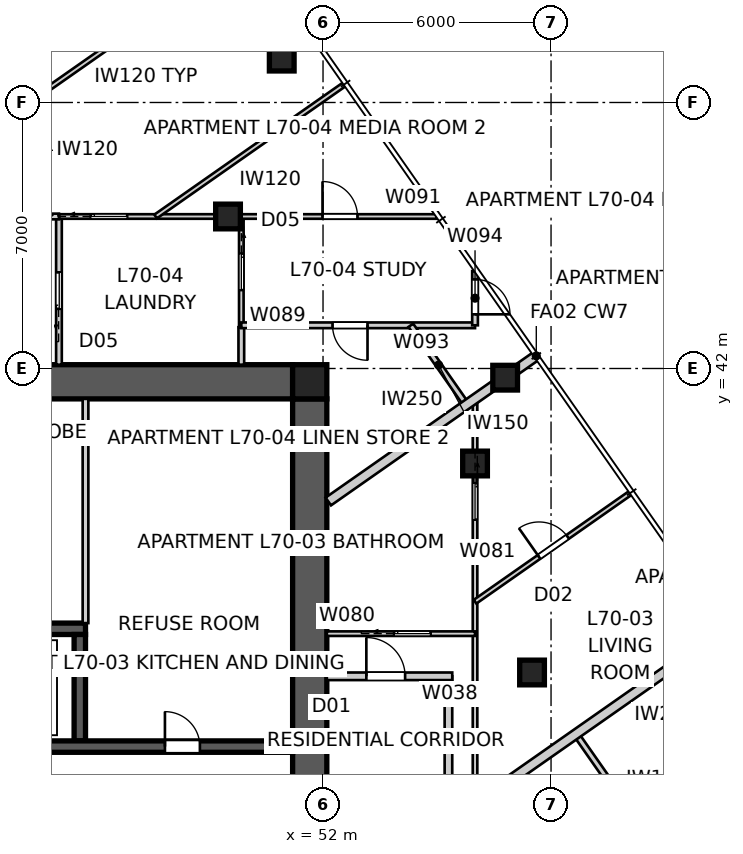
"""IFC4 building model, lengths in metres.
Left out: names, types, materials, properties, quantities, classifications, styles, units other than length and angle.
Written with IfcOpenShell. Run it as: python <this file> out.ifc"""

import sys

from ifc_helpers import new_model, si_unit, direction, frame, frame_2d, origin, origin_2d, place, context, subcontext, project, spatial, polyline, rectangle, outline, extrude, element, fill, save


model = new_model("IFC4")
c1 = context("Model", 3, precision=1e-05, world=origin(), true_north=direction((0.0, 1.0)))
c2 = subcontext(c1, "Body", "Model", "MODEL_VIEW")
j1 = project(units=[si_unit("LENGTHUNIT", "METRE"), si_unit("PLANEANGLEUNIT", "RADIAN")], contexts=[c1])
p1 = place(None, origin())
s1 = spatial("IfcSite", under=j1, at=p1, CompositionType="ELEMENT")
p2 = place(p1, origin())
s2 = spatial("IfcBuilding", under=s1, at=p2, CompositionType="ELEMENT")
p3 = place(p2, frame((0.0, 0.0, 254.0)))
s3 = spatial("IfcBuildingStorey", under=s2, at=p3, CompositionType="ELEMENT", Elevation=254.0)
p4 = place(p3, frame((28.8, 41.65, 0.0), z_axis=(0.0, 0.0, 1.0), x_axis=(1.0, 0.0, 0.0)))
e1 = element("IfcWall", 1, at=p4, inside=s3, PredefinedType="SHEAR", context=c2, shape_type="SweptSolid", body=[
    extrude(outline(polyline([(0.0, -0.45), (22.4, -0.45), (22.4, -0.025), (22.85, -0.025), (22.85, 0.025), (22.4, 0.025), (22.4, 0.45), (0.0, 0.45), (0.0, 0.025), (-0.45, 0.025), (-0.45, -0.025), (0.0, -0.025), (0.0, -0.45)])), origin(), (0.0, 0.0, 1.0), 3.4),
])
p5 = place(p3, frame((51.65, 18.8, 0.0), z_axis=(0.0, 0.0, 1.0), x_axis=(0.0, 1.0, 0.0)))
e2 = element("IfcWall", 2, at=p5, inside=s3, PredefinedType="SHEAR", context=c2, shape_type="SweptSolid", body=[
    extrude(outline(polyline([(0.0, -0.45), (22.4, -0.45), (22.4, -0.025), (22.85, -0.025), (22.85, 0.025), (22.4, 0.025), (22.4, 0.45), (0.0, 0.45), (0.0, 0.025), (-0.45, 0.025), (-0.45, -0.025), (0.0, -0.025), (0.0, -0.45)])), origin(), (0.0, 0.0, 1.0), 3.4),
])
p6 = place(p5, frame((11.14, 0.0, 0.0)))
e3 = element("IfcOpeningElement", 3, at=p6, cuts=e2, PredefinedType="OPENING", context=c2, shape_type="SweptSolid", body=[
    extrude(rectangle(XDim=1.02, YDim=2.4, at=frame_2d((0.51, 1.2))), frame((0.0, 0.46, 0.0), z_axis=(0.0, -1.0, 0.0), x_axis=(1.0, 0.0, 0.0)), (0.0, 0.0, 1.0), 0.92),
])
p7 = place(p3, frame((28.8, 32.05, 0.0), z_axis=(0.0, 0.0, 1.0), x_axis=(1.0, 0.0, 0.0)))
e4 = element("IfcWall", 4, at=p7, inside=s3, PredefinedType="SHEAR", context=c2, shape_type="SweptSolid", body=[
    extrude(rectangle(XDim=22.4, YDim=0.3, at=frame_2d((11.2, 0.0))), origin(), (0.0, 0.0, 1.0), 3.4),
])
p8 = place(p7, frame((19.04, 0.0, 0.0)))
e5 = element("IfcOpeningElement", 5, at=p8, cuts=e4, PredefinedType="OPENING", context=c2, shape_type="SweptSolid", body=[
    extrude(rectangle(XDim=0.92, YDim=2.1, at=frame_2d((0.46, 1.05))), frame((0.0, 0.16, 0.0), z_axis=(0.0, -1.0, 0.0), x_axis=(1.0, 0.0, 0.0)), (0.0, 0.0, 1.0), 0.32),
])
p9 = place(p7, frame((1.265, 0.0, 0.0)))
e6 = element("IfcOpeningElement", 6, at=p9, cuts=e4, PredefinedType="OPENING", context=c2, shape_type="SweptSolid", body=[
    extrude(rectangle(XDim=1.02, YDim=2.1, at=frame_2d((0.51, 1.05))), frame((0.0, 0.16, 0.0), z_axis=(0.0, -1.0, 0.0), x_axis=(1.0, 0.0, 0.0)), (0.0, 0.0, 1.0), 0.32),
])
p10 = place(p7, frame((4.015, 0.0, 0.0)))
e7 = element("IfcOpeningElement", 7, at=p10, cuts=e4, PredefinedType="OPENING", context=c2, shape_type="SweptSolid", body=[
    extrude(rectangle(XDim=0.92, YDim=2.1, at=frame_2d((0.46, 1.05))), frame((0.0, 0.16, 0.0), z_axis=(0.0, -1.0, 0.0), x_axis=(1.0, 0.0, 0.0)), (0.0, 0.0, 1.0), 0.32),
])
p11 = place(p7, frame((6.115, 0.0, 0.0)))
e8 = element("IfcOpeningElement", 8, at=p11, cuts=e4, PredefinedType="OPENING", context=c2, shape_type="SweptSolid", body=[
    extrude(rectangle(XDim=0.92, YDim=2.1, at=frame_2d((0.46, 1.05))), frame((0.0, 0.16, 0.0), z_axis=(0.0, -1.0, 0.0), x_axis=(1.0, 0.0, 0.0)), (0.0, 0.0, 1.0), 0.32),
])
p12 = place(p7, frame((9.79, 0.0, 0.0)))
e9 = element("IfcOpeningElement", 9, at=p12, cuts=e4, PredefinedType="OPENING", context=c2, shape_type="SweptSolid", body=[
    extrude(rectangle(XDim=0.92, YDim=2.1, at=frame_2d((0.46, 1.05))), frame((0.0, 0.16, 0.0), z_axis=(0.0, -1.0, 0.0), x_axis=(1.0, 0.0, 0.0)), (0.0, 0.0, 1.0), 0.32),
])
p13 = place(p7, frame((12.05, 0.0, 0.0)))
e10 = element("IfcOpeningElement", 10, at=p13, cuts=e4, PredefinedType="OPENING", context=c2, shape_type="SweptSolid", body=[
    extrude(rectangle(XDim=1.1, YDim=2.1, at=frame_2d((0.55, 1.05))), frame((0.0, 0.16, 0.0), z_axis=(0.0, -1.0, 0.0), x_axis=(1.0, 0.0, 0.0)), (0.0, 0.0, 1.0), 0.32),
])
p14 = place(p7, frame((14.85, 0.0, 0.0)))
e11 = element("IfcOpeningElement", 11, at=p14, cuts=e4, PredefinedType="OPENING", context=c2, shape_type="SweptSolid", body=[
    extrude(rectangle(XDim=1.1, YDim=2.1, at=frame_2d((0.55, 1.05))), frame((0.0, 0.16, 0.0), z_axis=(0.0, -1.0, 0.0), x_axis=(1.0, 0.0, 0.0)), (0.0, 0.0, 1.0), 0.32),
])
p15 = place(p3, frame((34.25, 35.15, 0.0), z_axis=(0.0, 0.0, 1.0), x_axis=(1.0, 0.0, 0.0)))
e12 = element("IfcWall", 12, at=p15, inside=s3, PredefinedType="SHEAR", context=c2, shape_type="SweptSolid", body=[
    extrude(rectangle(XDim=11.5, YDim=0.3, at=frame_2d((5.75, 0.0))), origin(), (0.0, 0.0, 1.0), 3.4),
])
p16 = place(p3, frame((45.6, 32.2, 0.0), z_axis=(0.0, 0.0, 1.0), x_axis=(0.0, 1.0, 0.0)))
e13 = element("IfcWall", 13, at=p16, inside=s3, PredefinedType="SHEAR", context=c2, shape_type="SweptSolid", body=[
    extrude(rectangle(XDim=2.8, YDim=0.3, at=frame_2d((1.4, 0.0))), origin(), (0.0, 0.0, 1.0), 3.4),
])
p17 = place(p3, frame((51.65, 41.65, 0.0), z_axis=(0.0, 0.0, 1.0), x_axis=(1.0, 0.0, 0.0)))
e14 = element("IfcColumn", 14, at=p17, inside=s3, PredefinedType="COLUMN", context=c2, shape_type="SweptSolid", body=[
    extrude(rectangle(XDim=0.9, YDim=0.9, at=origin_2d()), origin(), (0.0, 0.0, 1.0), 3.4),
])
for number, where, z_axis, x_axis in (
    (15, (56.793, 41.758, 0.0), (0.0, 0.0, 1.0), (1.0, 0.0, 0.0)),
    (16, (50.914, 50.155, 0.0), (0.0, 0.0, 1.0), (1.0, 0.0, 0.0)),
    (17, (57.5, 34.0, 0.0), (0.0, 0.0, 1.0), (1.0, 0.0, 0.0)),
    (18, (56.0, 39.5, 0.0), (0.0, 0.0, 1.0), (1.0, 0.0, 0.0)),
    (19, (49.5, 46.0, 0.0), (0.0, 0.0, 1.0), (1.0, 0.0, 0.0)),
):
    element("IfcColumn", number, at=place(p3, frame(where, z_axis=z_axis, x_axis=x_axis)), inside=s3, PredefinedType="COLUMN", context=c2, shape_type="SweptSolid", body=[
        extrude(rectangle(XDim=0.65, YDim=0.65, at=origin_2d()), origin(), (0.0, 0.0, 1.0), 3.4),
    ])
p18 = place(p3, frame((55.3, 26.1, 0.0), z_axis=(0.0, 0.0, 1.0), x_axis=(0.0, 1.0, 0.0)))
e20 = element("IfcWall", 20, at=p18, inside=s3, PredefinedType="PARTITIONING", context=c2, shape_type="SweptSolid", body=[
    extrude(rectangle(XDim=7.8, YDim=0.2, at=frame_2d((3.9, 0.0))), origin(), (0.0, 0.0, 1.0), 3.25),
])
p19 = place(p3, frame((52.1, 33.9, 0.0), z_axis=(0.0, 0.0, 1.0), x_axis=(1.0, 0.0, 0.0)))
e21 = element("IfcWall", 21, at=p19, inside=s3, PredefinedType="PARTITIONING", context=c2, shape_type="SweptSolid", body=[
    extrude(rectangle(XDim=3.3, YDim=0.2, at=frame_2d((1.65, 0.0))), origin(), (0.0, 0.0, 1.0), 3.25),
])
p20 = place(p19, frame((1.04, 0.0, 0.0)))
e22 = element("IfcOpeningElement", 22, at=p20, cuts=e21, PredefinedType="OPENING", context=c2, shape_type="SweptSolid", body=[
    extrude(rectangle(XDim=1.02, YDim=2.34, at=frame_2d((0.51, 1.17))), frame((0.0, 0.11, 0.0), z_axis=(0.0, -1.0, 0.0), x_axis=(1.0, 0.0, 0.0)), (0.0, 0.0, 1.0), 0.22),
])
p21 = place(p3, frame((57.612, 42.332, 0.0), z_axis=(0.0, 0.0, 1.0), x_axis=(-0.819161528122, -0.573562891796, 0.0)))
e23 = element("IfcWall", 23, at=p21, inside=s3, PredefinedType="PARTITIONING", context=c2, shape_type="SweptSolid", body=[
    extrude(rectangle(XDim=6.681, YDim=0.25, at=frame_2d((3.341, 0.0))), origin(), (0.0, 0.0, 1.0), 3.25),
])
p22 = place(p3, frame((62.631, 35.164, 0.0), z_axis=(0.0, 0.0, 1.0), x_axis=(-0.819152220062, -0.573576185321, 0.0)))
e24 = element("IfcWall", 24, at=p22, inside=s3, PredefinedType="PARTITIONING", context=c2, shape_type="SweptSolid", body=[
    extrude(rectangle(XDim=8.779, YDim=0.25, at=frame_2d((4.39, 0.0))), origin(), (0.0, 0.0, 1.0), 3.25),
])
p23 = place(p3, frame((45.75, 41.2, 0.0), z_axis=(0.0, 0.0, 1.0), x_axis=(0.0, -1.0, 0.0)))
e25 = element("IfcWall", 25, at=p23, inside=s3, PredefinedType="SOLIDWALL", context=c2, shape_type="SweptSolid", body=[
    extrude(rectangle(XDim=5.9, YDim=0.15, at=frame_2d((2.95, 0.0))), origin(), (0.0, 0.0, 1.0), 3.25),
])
p24 = place(p3, frame((56.0, 41.203, 0.0), z_axis=(0.0, 0.0, 1.0), x_axis=(0.0, -1.0, 0.0)))
e26 = element("IfcWall", 26, at=p24, inside=s3, PredefinedType="PARTITIONING", context=c2, shape_type="SweptSolid", body=[
    extrude(rectangle(XDim=26.198, YDim=0.12, at=frame_2d((13.099, 0.0))), origin(), (0.0, 0.0, 1.0), 2.549),
])
p25 = place(p24, frame((21.188, 0.0, 0.0)))
e27 = element("IfcOpeningElement", 27, at=p25, cuts=e26, PredefinedType="OPENING", context=c2, shape_type="SweptSolid", body=[
    extrude(rectangle(XDim=0.92, YDim=2.34, at=frame_2d((0.46, 1.17))), frame((0.0, 0.07, 0.0), z_axis=(0.0, -1.0, 0.0), x_axis=(1.0, 0.0, 0.0)), (0.0, 0.0, 1.0), 0.14),
])
p26 = place(p24, frame((17.537, 0.0, 0.0)))
e28 = element("IfcOpeningElement", 28, at=p26, cuts=e26, PredefinedType="OPENING", context=c2, shape_type="SweptSolid", body=[
    extrude(rectangle(XDim=0.92, YDim=2.34, at=frame_2d((0.46, 1.17))), frame((0.0, 0.07, 0.0), z_axis=(0.0, -1.0, 0.0), x_axis=(1.0, 0.0, 0.0)), (0.0, 0.0, 1.0), 0.14),
])
p27 = place(p24, frame((2.221, 0.0, 0.0)))
e29 = element("IfcOpeningElement", 29, at=p27, cuts=e26, PredefinedType="OPENING", context=c2, shape_type="SweptSolid", body=[
    extrude(rectangle(XDim=0.96, YDim=2.1, at=frame_2d((0.48, 1.05))), frame((0.0, 0.07, 0.0), z_axis=(0.0, -1.0, 0.0), x_axis=(1.0, 0.0, 0.0)), (0.0, 0.0, 1.0), 0.14),
])
p28 = place(p3, frame((61.164, 28.797, 0.0), z_axis=(0.0, 0.0, 1.0), x_axis=(-0.573563463091, 0.81916112811, 0.0)))
e30 = element("IfcWall", 30, at=p28, inside=s3, PredefinedType="SOLIDWALL", context=c2, shape_type="SweptSolid", body=[
    extrude(rectangle(XDim=4.375, YDim=0.15, at=frame_2d((2.188, 0.0))), origin(), (0.0, 0.0, 1.0), 3.25),
])
p29 = place(p3, frame((52.1, 35.022, 0.0), z_axis=(0.0, 0.0, 1.0), x_axis=(1.0, 0.0, 0.0)))
e31 = element("IfcWall", 31, at=p29, inside=s3, PredefinedType="PARTITIONING", context=c2, shape_type="SweptSolid", body=[
    extrude(rectangle(XDim=3.9, YDim=0.12, at=frame_2d((1.95, 0.0))), origin(), (0.0, 0.0, 1.0), 3.25),
])
p30 = place(p29, frame((1.77, 0.0, 0.0)))
e32 = element("IfcOpeningElement", 32, at=p30, cuts=e31, PredefinedType="OPENING", context=c2, shape_type="SweptSolid", body=[
    extrude(rectangle(XDim=0.96, YDim=2.1, at=frame_2d((0.48, 1.05))), frame((0.0, 0.07, 0.0), z_axis=(0.0, -1.0, 0.0), x_axis=(1.0, 0.0, 0.0)), (0.0, 0.0, 1.0), 0.14),
])
p31 = place(p3, frame((56.0, 35.862, 0.0), z_axis=(0.0, 0.0, 1.0), x_axis=(0.819144584763, 0.57358708951, 0.0)))
e33 = element("IfcWall", 33, at=p31, inside=s3, PredefinedType="PARTITIONING", context=c2, shape_type="SweptSolid", body=[
    extrude(rectangle(XDim=4.991, YDim=0.12, at=frame_2d((2.496, 0.0))), origin(), (0.0, 0.0, 1.0), 3.25),
])
p32 = place(p31, frame((2.055, 0.0, 0.0)))
e34 = element("IfcOpeningElement", 34, at=p32, cuts=e33, PredefinedType="OPENING", context=c2, shape_type="SweptSolid", body=[
    extrude(rectangle(XDim=0.92, YDim=2.34, at=frame_2d((0.46, 1.17))), frame((0.0, 0.07, 0.0), z_axis=(0.0, -1.0, 0.0), x_axis=(1.0, 0.0, 0.0)), (0.0, 0.0, 1.0), 0.14),
])
p33 = place(p3, frame((45.051, 42.1, 0.0), z_axis=(0.0, 0.0, 1.0), x_axis=(0.0, 1.0, 0.0)))
e35 = element("IfcWall", 35, at=p33, inside=s3, PredefinedType="SOLIDWALL", context=c2, shape_type="SweptSolid", body=[
    extrude(rectangle(XDim=3.9, YDim=0.15, at=frame_2d((1.95, 0.0))), origin(), (0.0, 0.0, 1.0), 3.25),
])
p34 = place(p33, frame((1.47, 0.0, 0.0)))
e36 = element("IfcOpeningElement", 36, at=p34, cuts=e35, PredefinedType="OPENING", context=c2, shape_type="SweptSolid", body=[
    extrude(rectangle(XDim=0.96, YDim=2.1, at=frame_2d((0.48, 1.05))), frame((0.0, 0.085, 0.0), z_axis=(0.0, -1.0, 0.0), x_axis=(1.0, 0.0, 0.0)), (0.0, 0.0, 1.0), 0.17),
])
p35 = place(p3, frame((49.85, 46.0, 0.0), z_axis=(0.0, 0.0, 1.0), x_axis=(0.0, -1.0, 0.0)))
e37 = element("IfcWall", 37, at=p35, inside=s3, PredefinedType="PARTITIONING", context=c2, shape_type="SweptSolid", body=[
    extrude(rectangle(XDim=2.913, YDim=0.12, at=frame_2d((1.457, 0.0))), origin(), (0.0, 0.0, 1.0), 3.25),
])
p36 = place(p35, frame((0.977, 0.0, 0.0)))
e38 = element("IfcOpeningElement", 38, at=p36, cuts=e37, PredefinedType="OPENING", context=c2, shape_type="SweptSolid", body=[
    extrude(rectangle(XDim=0.96, YDim=2.1, at=frame_2d((0.48, 1.05))), frame((0.0, 0.07, 0.0), z_axis=(0.0, -1.0, 0.0), x_axis=(1.0, 0.0, 0.0)), (0.0, 0.0, 1.0), 0.14),
])
p37 = place(p3, frame((49.85, 43.087, 0.0), z_axis=(0.0, 0.0, 1.0), x_axis=(0.0, -1.0, 0.0)))
e39 = element("IfcWall", 39, at=p37, inside=s3, PredefinedType="SOLIDWALL", context=c2, shape_type="SweptSolid", body=[
    extrude(rectangle(XDim=0.987, YDim=0.15, at=frame_2d((0.493, 0.0))), origin(), (0.0, 0.0, 1.0), 3.25),
])
p38 = place(p3, frame((45.051, 46.0, 0.0), z_axis=(0.0, 0.0, 1.0), x_axis=(1.0, 0.0, 0.0)))
e40 = element("IfcWall", 40, at=p38, inside=s3, PredefinedType="PARTITIONING", context=c2, shape_type="SweptSolid", body=[
    extrude(rectangle(XDim=9.943, YDim=0.12, at=frame_2d((4.972, 0.0))), origin(), (0.0, 0.0, 1.0), 2.549),
])
p39 = place(p38, frame((0.835, 0.0, 0.0)))
e41 = element("IfcOpeningElement", 41, at=p39, cuts=e40, PredefinedType="OPENING", context=c2, shape_type="SweptSolid", body=[
    extrude(rectangle(XDim=0.96, YDim=2.1, at=frame_2d((0.48, 1.05))), frame((0.0, 0.07, 0.0), z_axis=(0.0, -1.0, 0.0), x_axis=(1.0, 0.0, 0.0)), (0.0, 0.0, 1.0), 0.14),
])
p40 = place(p38, frame((6.935, 0.0, 0.0)))
e42 = element("IfcOpeningElement", 42, at=p40, cuts=e40, PredefinedType="OPENING", context=c2, shape_type="SweptSolid", body=[
    extrude(rectangle(XDim=0.92, YDim=2.34, at=frame_2d((0.46, 1.17))), frame((0.0, 0.07, 0.0), z_axis=(0.0, -1.0, 0.0), x_axis=(1.0, 0.0, 0.0)), (0.0, 0.0, 1.0), 0.14),
])
p41 = place(p3, frame((40.253, 46.0, 0.0), z_axis=(0.0, 0.0, 1.0), x_axis=(1.0, 0.0, 0.0)))
e43 = element("IfcWall", 43, at=p41, inside=s3, PredefinedType="SOLIDWALL", context=c2, shape_type="SweptSolid", body=[
    extrude(rectangle(XDim=4.799, YDim=0.15, at=frame_2d((2.399, 0.0))), origin(), (0.0, 0.0, 1.0), 3.25),
])
p42 = place(p3, frame((56.0, 43.137, 0.0), z_axis=(0.0, 0.0, 1.0), x_axis=(-1.0, 0.0, 0.0)))
e44 = element("IfcWall", 44, at=p42, inside=s3, PredefinedType="SOLIDWALL", context=c2, shape_type="SweptSolid", body=[
    extrude(rectangle(XDim=6.15, YDim=0.15, at=frame_2d((3.075, 0.0))), origin(), (0.0, 0.0, 1.0), 3.25),
])
p43 = place(p42, frame((2.829, 0.0, 0.0)))
e45 = element("IfcOpeningElement", 45, at=p43, cuts=e44, PredefinedType="OPENING", context=c2, shape_type="SweptSolid", body=[
    extrude(rectangle(XDim=0.92, YDim=2.1, at=frame_2d((0.46, 1.05))), frame((0.0, 0.085, 0.0), z_axis=(0.0, -1.0, 0.0), x_axis=(1.0, 0.0, 0.0)), (0.0, 0.0, 1.0), 0.17),
])
p44 = place(p3, frame((56.0, 44.564, 0.0), z_axis=(0.0, 0.0, 1.0), x_axis=(0.0, -1.0, 0.0)))
e46 = element("IfcWall", 46, at=p44, inside=s3, PredefinedType="SOLIDWALL", context=c2, shape_type="SweptSolid", body=[
    extrude(rectangle(XDim=1.427, YDim=0.15, at=frame_2d((0.714, 0.0))), origin(), (0.0, 0.0, 1.0), 3.25),
])
p45 = place(p44, frame((0.219, 0.0, 0.0)))
e47 = element("IfcOpeningElement", 47, at=p45, cuts=e46, PredefinedType="OPENING", context=c2, shape_type="SweptSolid", body=[
    extrude(rectangle(XDim=0.92, YDim=2.34, at=frame_2d((0.46, 1.17))), frame((0.0, 0.085, 0.0), z_axis=(0.0, -1.0, 0.0), x_axis=(1.0, 0.0, 0.0)), (0.0, 0.0, 1.0), 0.17),
])
p46 = place(p3, frame((54.31, 43.137, 0.0), z_axis=(0.0, 0.0, 1.0), x_axis=(0.573513690046, -0.819195976144, 0.0)))
e48 = element("IfcWall", 48, at=p46, inside=s3, PredefinedType="SOLIDWALL", context=c2, shape_type="SweptSolid", body=[
    extrude(rectangle(XDim=2.553, YDim=0.15, at=frame_2d((1.276, 0.0))), origin(), (0.0, 0.0, 1.0), 3.25),
])
p47 = place(p3, frame((50.051, 53.06, 0.0), z_axis=(0.0, 0.0, 1.0), x_axis=(-0.819152099525, -0.573576357466, 0.0)))
e49 = element("IfcWall", 49, at=p47, inside=s3, PredefinedType="PARTITIONING", context=c2, shape_type="SweptSolid", body=[
    extrude(rectangle(XDim=8.335, YDim=0.12, at=frame_2d((4.167, 0.0))), origin(), (0.0, 0.0, 1.0), 3.25),
])
p48 = place(p3, frame((52.56, 49.477, 0.0), z_axis=(0.0, 0.0, 1.0), x_axis=(-0.81915432861, -0.573573173989, 0.0)))
e50 = element("IfcWall", 50, at=p48, inside=s3, PredefinedType="PARTITIONING", context=c2, shape_type="SweptSolid", body=[
    extrude(rectangle(XDim=6.061, YDim=0.12, at=frame_2d((3.031, 0.0))), origin(), (0.0, 0.0, 1.0), 3.25),
])
p49 = place(p8, origin())
e51 = element("IfcDoor", 51, at=p49, inside=s3, OperationType="SINGLE_SWING_LEFT", PredefinedType="DOOR", context=c2, shape_type="SweptSolid", body=[
    extrude(rectangle(XDim=0.92, YDim=2.1, at=frame_2d((0.46, 1.05))), frame((0.0, 0.025, 0.0), z_axis=(0.0, -1.0, 0.0), x_axis=(1.0, 0.0, 0.0)), (0.0, 0.0, 1.0), 0.05),
])
fill(e5, e51)
p50 = place(p20, origin())
e52 = element("IfcDoor", 52, at=p50, inside=s3, OperationType="SINGLE_SWING_LEFT", PredefinedType="DOOR", context=c2, shape_type="SweptSolid", body=[
    extrude(rectangle(XDim=1.02, YDim=2.34, at=frame_2d((0.51, 1.17))), frame((0.0, 0.025, 0.0), z_axis=(0.0, -1.0, 0.0), x_axis=(1.0, 0.0, 0.0)), (0.0, 0.0, 1.0), 0.05),
])
fill(e22, e52)
p51 = place(p30, origin())
e53 = element("IfcDoor", 53, at=p51, inside=s3, OperationType="SLIDING_TO_LEFT", PredefinedType="DOOR", context=c2, shape_type="SweptSolid", body=[
    extrude(rectangle(XDim=0.96, YDim=2.1, at=frame_2d((0.48, 1.05))), frame((0.0, 0.025, 0.0), z_axis=(0.0, -1.0, 0.0), x_axis=(1.0, 0.0, 0.0)), (0.0, 0.0, 1.0), 0.05),
])
fill(e32, e53)
p52 = place(p27, origin())
e54 = element("IfcDoor", 54, at=p52, inside=s3, OperationType="SLIDING_TO_LEFT", PredefinedType="DOOR", context=c2, shape_type="SweptSolid", body=[
    extrude(rectangle(XDim=0.96, YDim=2.1, at=frame_2d((0.48, 1.05))), frame((0.0, 0.025, 0.0), z_axis=(0.0, -1.0, 0.0), x_axis=(1.0, 0.0, 0.0)), (0.0, 0.0, 1.0), 0.05),
])
fill(e29, e54)
p53 = place(p34, origin())
e55 = element("IfcDoor", 55, at=p53, inside=s3, OperationType="SLIDING_TO_LEFT", PredefinedType="DOOR", context=c2, shape_type="SweptSolid", body=[
    extrude(rectangle(XDim=0.96, YDim=2.1, at=frame_2d((0.48, 1.05))), frame((0.0, 0.025, 0.0), z_axis=(0.0, -1.0, 0.0), x_axis=(1.0, 0.0, 0.0)), (0.0, 0.0, 1.0), 0.05),
])
fill(e36, e55)
p54 = place(p36, origin())
e56 = element("IfcDoor", 56, at=p54, inside=s3, OperationType="SLIDING_TO_LEFT", PredefinedType="DOOR", context=c2, shape_type="SweptSolid", body=[
    extrude(rectangle(XDim=0.96, YDim=2.1, at=frame_2d((0.48, 1.05))), frame((0.0, 0.025, 0.0), z_axis=(0.0, -1.0, 0.0), x_axis=(1.0, 0.0, 0.0)), (0.0, 0.0, 1.0), 0.05),
])
fill(e38, e56)
p55 = place(p39, origin())
e57 = element("IfcDoor", 57, at=p55, inside=s3, OperationType="SLIDING_TO_LEFT", PredefinedType="DOOR", context=c2, shape_type="SweptSolid", body=[
    extrude(rectangle(XDim=0.96, YDim=2.1, at=frame_2d((0.48, 1.05))), frame((0.0, 0.025, 0.0), z_axis=(0.0, -1.0, 0.0), x_axis=(1.0, 0.0, 0.0)), (0.0, 0.0, 1.0), 0.05),
])
fill(e41, e57)
p56 = place(p40, origin())
e58 = element("IfcDoor", 58, at=p56, inside=s3, OperationType="SINGLE_SWING_LEFT", PredefinedType="DOOR", context=c2, shape_type="SweptSolid", body=[
    extrude(rectangle(XDim=0.92, YDim=2.34, at=frame_2d((0.46, 1.17))), frame((0.0, 0.025, 0.0), z_axis=(0.0, -1.0, 0.0), x_axis=(1.0, 0.0, 0.0)), (0.0, 0.0, 1.0), 0.05),
])
fill(e42, e58)
p57 = place(p43, origin())
e59 = element("IfcDoor", 59, at=p57, inside=s3, OperationType="SINGLE_SWING_LEFT", PredefinedType="DOOR", context=c2, shape_type="SweptSolid", body=[
    extrude(rectangle(XDim=0.92, YDim=2.1, at=frame_2d((0.46, 1.05))), frame((0.0, 0.025, 0.0), z_axis=(0.0, -1.0, 0.0), x_axis=(1.0, 0.0, 0.0)), (0.0, 0.0, 1.0), 0.05),
])
fill(e45, e59)
p58 = place(p45, origin())
e60 = element("IfcDoor", 60, at=p58, inside=s3, OperationType="SINGLE_SWING_RIGHT", PredefinedType="DOOR", context=c2, shape_type="SweptSolid", body=[
    extrude(rectangle(XDim=0.92, YDim=2.34, at=frame_2d((0.46, 1.17))), frame((0.0, 0.025, 0.0), z_axis=(0.0, -1.0, 0.0), x_axis=(1.0, 0.0, 0.0)), (0.0, 0.0, 1.0), 0.05),
])
fill(e47, e60)
p59 = place(p32, origin())
e61 = element("IfcDoor", 61, at=p59, inside=s3, OperationType="SINGLE_SWING_LEFT", PredefinedType="DOOR", context=c2, shape_type="SweptSolid", body=[
    extrude(rectangle(XDim=0.92, YDim=2.34, at=frame_2d((0.46, 1.17))), frame((0.0, 0.025, 0.0), z_axis=(0.0, -1.0, 0.0), x_axis=(1.0, 0.0, 0.0)), (0.0, 0.0, 1.0), 0.05),
])
fill(e34, e61)
save(model, sys.argv[1])
